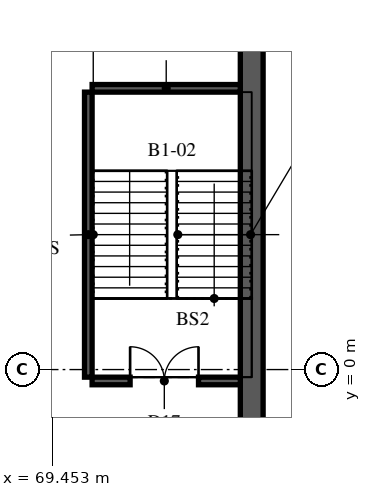
"""IFC4 building model, lengths in metres.
Left out: names, types, materials, properties, quantities, classifications, styles, units other than length and angle.
Written with IfcOpenShell. Run it as: python <this file> out.ifc"""

import sys

from ifc_helpers import new_model, si_unit, direction, frame, frame_2d, origin, place, context, subcontext, project, spatial, rectangle, extrude, element, fill, save


model = new_model("IFC4")
c1 = context("Model", 3, precision=1e-05, world=origin(), true_north=direction((0.0, 1.0)))
c2 = subcontext(c1, "Body", "Model", "MODEL_VIEW")
j1 = project(units=[si_unit("LENGTHUNIT", "METRE"), si_unit("PLANEANGLEUNIT", "RADIAN")], contexts=[c1])
p1 = place(None, origin())
s1 = spatial("IfcSite", under=j1, at=p1, CompositionType="ELEMENT")
p2 = place(p1, origin())
s2 = spatial("IfcBuilding", under=s1, at=p2, CompositionType="ELEMENT")
p3 = place(p2, frame((0.0, 0.0, -4.0)))
s3 = spatial("IfcBuildingStorey", under=s2, at=p3, CompositionType="ELEMENT", Elevation=-4.0)
p4 = place(p3, frame((74.7, -16.9, 0.0), z_axis=(0.0, 0.0, 1.0), x_axis=(0.0, 1.0, 0.0)))
e1 = element("IfcWall", 1, at=p4, inside=s3, PredefinedType="SOLIDWALL", context=c2, shape_type="SweptSolid", body=[
    extrude(rectangle(XDim=73.8, YDim=0.6, at=frame_2d((36.9, 0.0))), origin(), (0.0, 0.0, 1.0), 4.0),
])
p5 = place(p3, frame((70.4, -0.2, 0.0), z_axis=(0.0, 0.0, 1.0), x_axis=(0.0, 1.0, 0.0)))
e2 = element("IfcWall", 2, at=p5, inside=s3, PredefinedType="SOLIDWALL", context=c2, shape_type="SweptSolid", body=[
    extrude(rectangle(XDim=7.5, YDim=0.2, at=frame_2d((3.75, 0.0))), origin(), (0.0, 0.0, 1.0), 4.0),
])
p6 = place(p3, frame((70.5, -0.3, 0.0), z_axis=(0.0, 0.0, 1.0), x_axis=(1.0, 0.0, 0.0)))
e3 = element("IfcWall", 3, at=p6, inside=s3, PredefinedType="SOLIDWALL", context=c2, shape_type="SweptSolid", body=[
    extrude(rectangle(XDim=3.9, YDim=0.2, at=frame_2d((1.95, 0.0))), origin(), (0.0, 0.0, 1.0), 4.0),
])
p7 = place(p6, frame((1.0, 0.0, 0.0)))
e4 = element("IfcOpeningElement", 4, at=p7, cuts=e3, PredefinedType="OPENING", context=c2, shape_type="SweptSolid", body=[
    extrude(rectangle(XDim=1.8, YDim=2.2, at=frame_2d((0.9, 1.1))), frame((0.0, 0.11, 0.0), z_axis=(0.0, -1.0, 0.0), x_axis=(1.0, 0.0, 0.0)), (0.0, 0.0, 1.0), 0.22),
])
p8 = place(p3, frame((70.5, 7.4, 0.0), z_axis=(0.0, 0.0, 1.0), x_axis=(1.0, 0.0, 0.0)))
e5 = element("IfcWall", 5, at=p8, inside=s3, PredefinedType="SOLIDWALL", context=c2, shape_type="SweptSolid", body=[
    extrude(rectangle(XDim=3.9, YDim=0.2, at=frame_2d((1.95, 0.0))), origin(), (0.0, 0.0, 1.0), 4.0),
])
p9 = place(p7, origin())
e6 = element("IfcDoor", 6, at=p9, inside=s3, OperationType="DOUBLE_DOOR_SINGLE_SWING", PredefinedType="DOOR", context=c2, shape_type="SweptSolid", body=[
    extrude(rectangle(XDim=1.8, YDim=2.2, at=frame_2d((0.9, 1.1))), frame((0.0, 0.025, 0.0), z_axis=(0.0, -1.0, 0.0), x_axis=(1.0, 0.0, 0.0)), (0.0, 0.0, 1.0), 0.05),
])
fill(e4, e6)
save(model, sys.argv[1])
